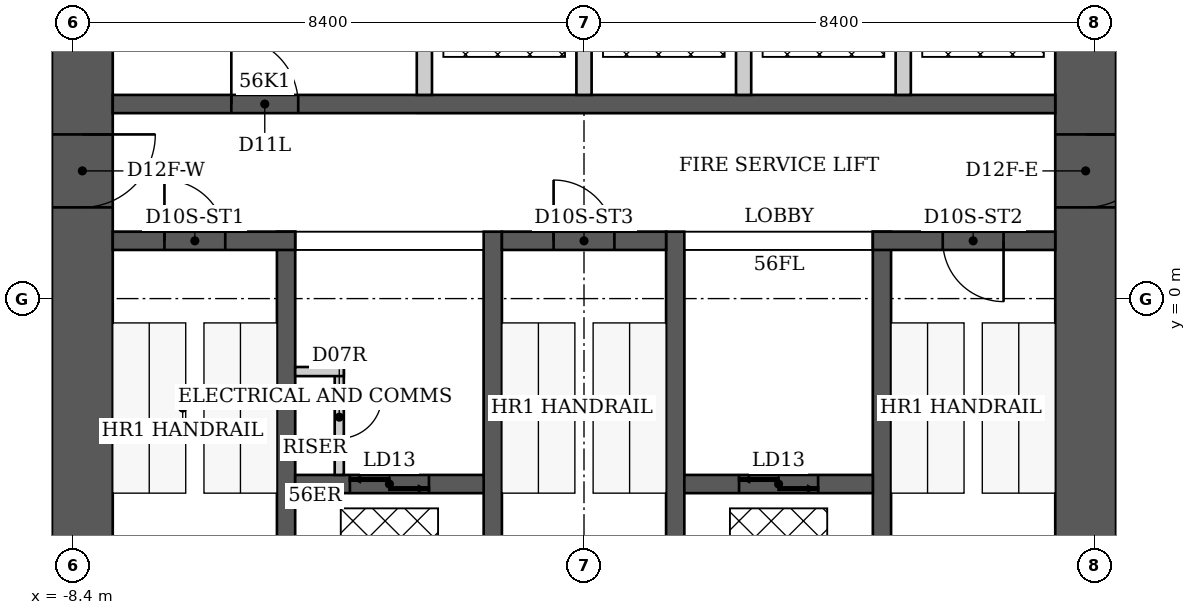
"""IFC4 building model, lengths in metres.
Left out: names, types, materials, properties, quantities, classifications, styles, units other than length and angle.
Written with IfcOpenShell. Run it as: python <this file> out.ifc"""

import sys

from ifc_helpers import new_model, si_unit, direction, frame, frame_2d, origin, place, context, subcontext, project, spatial, rectangle, extrude, element, fill, save


model = new_model("IFC4")
c1 = context("Model", 3, precision=1e-05, world=origin(), true_north=direction((0.0, 1.0)))
c2 = subcontext(c1, "Body", "Model", "MODEL_VIEW")
j1 = project(units=[si_unit("LENGTHUNIT", "METRE"), si_unit("PLANEANGLEUNIT", "RADIAN")], contexts=[c1])
p1 = place(None, origin())
s1 = spatial("IfcSite", under=j1, at=p1, CompositionType="ELEMENT")
p2 = place(p1, origin())
s2 = spatial("IfcBuilding", under=s1, at=p2, CompositionType="ELEMENT")
p3 = place(p2, frame((0.0, 0.0, 225.0)))
s3 = spatial("IfcBuildingStorey", under=s2, at=p3, CompositionType="ELEMENT", Elevation=225.0)
p4 = place(p3, frame((-8.25, -6.1, 0.0), z_axis=(0.0, 0.0, 1.0), x_axis=(0.0, 1.0, 0.0)))
e1 = element("IfcWall", 1, at=p4, inside=s3, PredefinedType="SHEAR", context=c2, shape_type="SweptSolid", body=[
    extrude(rectangle(XDim=12.2, YDim=1.0, at=frame_2d((6.1, 0.0))), origin(), (0.0, 0.0, 1.0), 3.8),
])
p5 = place(p4, frame((7.6, 0.0, 0.0)))
e2 = element("IfcOpeningElement", 2, at=p5, cuts=e1, PredefinedType="OPENING", context=c2, shape_type="SweptSolid", body=[
    extrude(rectangle(XDim=1.2, YDim=2.2, at=frame_2d((0.6, 1.1))), frame((0.0, 0.5, 0.0), z_axis=(0.0, -1.0, 0.0), x_axis=(1.0, 0.0, 0.0)), (0.0, 0.0, 1.0), 1.0),
])
p6 = place(p3, frame((8.25, -6.1, 0.0), z_axis=(0.0, 0.0, 1.0), x_axis=(0.0, 1.0, 0.0)))
e3 = element("IfcWall", 3, at=p6, inside=s3, PredefinedType="SHEAR", context=c2, shape_type="SweptSolid", body=[
    extrude(rectangle(XDim=12.2, YDim=1.0, at=frame_2d((6.1, 0.0))), origin(), (0.0, 0.0, 1.0), 3.8),
])
p7 = place(p6, frame((7.6, 0.0, 0.0)))
e4 = element("IfcOpeningElement", 4, at=p7, cuts=e3, PredefinedType="OPENING", context=c2, shape_type="SweptSolid", body=[
    extrude(rectangle(XDim=1.2, YDim=2.2, at=frame_2d((0.6, 1.1))), frame((0.0, 0.5, 0.0), z_axis=(0.0, -1.0, 0.0), x_axis=(1.0, 0.0, 0.0)), (0.0, 0.0, 1.0), 1.0),
])
for number, where, z_axis, x_axis in (
    (5, (-4.9, -6.1, 0.0), (0.0, 0.0, 1.0), (0.0, 1.0, 0.0)),
    (6, (-1.5, -6.1, 0.0), (0.0, 0.0, 1.0), (0.0, 1.0, 0.0)),
    (7, (1.5, -6.1, 0.0), (0.0, 0.0, 1.0), (0.0, 1.0, 0.0)),
    (8, (4.9, -6.1, 0.0), (0.0, 0.0, 1.0), (0.0, 1.0, 0.0)),
):
    element("IfcWall", number, at=place(p3, frame(where, z_axis=z_axis, x_axis=x_axis)), inside=s3, PredefinedType="SHEAR", context=c2, shape_type="SweptSolid", body=[
        extrude(rectangle(XDim=7.2, YDim=0.3, at=frame_2d((3.6, 0.0))), origin(), (0.0, 0.0, 1.0), 3.8),
    ])
p8 = place(p3, frame((-7.75, 0.95, 0.0), z_axis=(0.0, 0.0, 1.0), x_axis=(1.0, 0.0, 0.0)))
e9 = element("IfcWall", 9, at=p8, inside=s3, PredefinedType="SHEAR", context=c2, shape_type="SweptSolid", body=[
    extrude(rectangle(XDim=3.0, YDim=0.3, at=frame_2d((1.5, 0.0))), origin(), (0.0, 0.0, 1.0), 3.8),
])
p9 = place(p8, frame((0.85, 0.0, 0.0)))
e10 = element("IfcOpeningElement", 10, at=p9, cuts=e9, PredefinedType="OPENING", context=c2, shape_type="SweptSolid", body=[
    extrude(rectangle(XDim=1.0, YDim=2.2, at=frame_2d((0.5, 1.1))), frame((0.0, 0.15, 0.0), z_axis=(0.0, -1.0, 0.0), x_axis=(1.0, 0.0, 0.0)), (0.0, 0.0, 1.0), 0.3),
])
p10 = place(p3, frame((-1.35, 0.95, 0.0), z_axis=(0.0, 0.0, 1.0), x_axis=(1.0, 0.0, 0.0)))
e11 = element("IfcWall", 11, at=p10, inside=s3, PredefinedType="SHEAR", context=c2, shape_type="SweptSolid", body=[
    extrude(rectangle(XDim=2.7, YDim=0.3, at=frame_2d((1.35, 0.0))), origin(), (0.0, 0.0, 1.0), 3.8),
])
p11 = place(p10, frame((0.85, 0.0, 0.0)))
e12 = element("IfcOpeningElement", 12, at=p11, cuts=e11, PredefinedType="OPENING", context=c2, shape_type="SweptSolid", body=[
    extrude(rectangle(XDim=1.0, YDim=2.2, at=frame_2d((0.5, 1.1))), frame((0.0, 0.15, 0.0), z_axis=(0.0, -1.0, 0.0), x_axis=(1.0, 0.0, 0.0)), (0.0, 0.0, 1.0), 0.3),
])
p12 = place(p3, frame((4.75, 0.95, 0.0), z_axis=(0.0, 0.0, 1.0), x_axis=(1.0, 0.0, 0.0)))
e13 = element("IfcWall", 13, at=p12, inside=s3, PredefinedType="SHEAR", context=c2, shape_type="SweptSolid", body=[
    extrude(rectangle(XDim=3.0, YDim=0.3, at=frame_2d((1.5, 0.0))), origin(), (0.0, 0.0, 1.0), 3.8),
])
p13 = place(p12, frame((1.15, 0.0, 0.0)))
e14 = element("IfcOpeningElement", 14, at=p13, cuts=e13, PredefinedType="OPENING", context=c2, shape_type="SweptSolid", body=[
    extrude(rectangle(XDim=1.0, YDim=2.2, at=frame_2d((0.5, 1.1))), frame((0.0, 0.15, 0.0), z_axis=(0.0, -1.0, 0.0), x_axis=(1.0, 0.0, 0.0)), (0.0, 0.0, 1.0), 0.3),
])
p14 = place(p3, frame((-4.75, -3.05, 0.0), z_axis=(0.0, 0.0, 1.0), x_axis=(1.0, 0.0, 0.0)))
e15 = element("IfcWall", 15, at=p14, inside=s3, PredefinedType="SHEAR", context=c2, shape_type="SweptSolid", body=[
    extrude(rectangle(XDim=3.1, YDim=0.3, at=frame_2d((1.55, 0.0))), origin(), (0.0, 0.0, 1.0), 3.8),
])
p15 = place(p14, frame((0.9, 0.0, 0.0)))
e16 = element("IfcOpeningElement", 16, at=p15, cuts=e15, PredefinedType="OPENING", context=c2, shape_type="SweptSolid", body=[
    extrude(rectangle(XDim=1.3, YDim=2.1, at=frame_2d((0.65, 1.05))), frame((0.0, 0.15, 0.0), z_axis=(0.0, -1.0, 0.0), x_axis=(1.0, 0.0, 0.0)), (0.0, 0.0, 1.0), 0.3),
])
p16 = place(p3, frame((1.65, -3.05, 0.0), z_axis=(0.0, 0.0, 1.0), x_axis=(1.0, 0.0, 0.0)))
e17 = element("IfcWall", 17, at=p16, inside=s3, PredefinedType="SHEAR", context=c2, shape_type="SweptSolid", body=[
    extrude(rectangle(XDim=3.1, YDim=0.3, at=frame_2d((1.55, 0.0))), origin(), (0.0, 0.0, 1.0), 3.8),
])
p17 = place(p16, frame((0.9, 0.0, 0.0)))
e18 = element("IfcOpeningElement", 18, at=p17, cuts=e17, PredefinedType="OPENING", context=c2, shape_type="SweptSolid", body=[
    extrude(rectangle(XDim=1.3, YDim=2.1, at=frame_2d((0.65, 1.05))), frame((0.0, 0.15, 0.0), z_axis=(0.0, -1.0, 0.0), x_axis=(1.0, 0.0, 0.0)), (0.0, 0.0, 1.0), 0.3),
])
p18 = place(p3, frame((-7.75, 3.2, 0.0), z_axis=(0.0, 0.0, 1.0), x_axis=(1.0, 0.0, 0.0)))
e19 = element("IfcWall", 19, at=p18, inside=s3, PredefinedType="SHEAR", context=c2, shape_type="SweptSolid", body=[
    extrude(rectangle(XDim=15.5, YDim=0.3, at=frame_2d((7.75, 0.0))), origin(), (0.0, 0.0, 1.0), 3.8),
])
p19 = place(p18, frame((1.95, 0.0, 0.0)))
e20 = element("IfcOpeningElement", 20, at=p19, cuts=e19, PredefinedType="OPENING", context=c2, shape_type="SweptSolid", body=[
    extrude(rectangle(XDim=1.1, YDim=2.2, at=frame_2d((0.55, 1.1))), frame((0.0, 0.15, 0.0), z_axis=(0.0, -1.0, 0.0), x_axis=(1.0, 0.0, 0.0)), (0.0, 0.0, 1.0), 0.3),
])
for number, where, z_axis, x_axis in (
    (21, (-2.625, 3.35, 0.0), (0.0, 0.0, 1.0), (0.0, 1.0, 0.0)),
    (22, (0.0, 3.35, 0.0), (0.0, 0.0, 1.0), (0.0, 1.0, 0.0)),
    (23, (2.625, 3.35, 0.0), (0.0, 0.0, 1.0), (0.0, 1.0, 0.0)),
    (24, (5.25, 3.35, 0.0), (0.0, 0.0, 1.0), (0.0, 1.0, 0.0)),
):
    element("IfcWall", number, at=place(p3, frame(where, z_axis=z_axis, x_axis=x_axis)), inside=s3, PredefinedType="PARTITIONING", context=c2, shape_type="SweptSolid", body=[
        extrude(rectangle(XDim=2.75, YDim=0.25, at=frame_2d((1.375, 0.0))), origin(), (0.0, 0.0, 1.0), 3.8),
    ])
p20 = place(p3, frame((-4.025, -2.9, 0.0), z_axis=(0.0, 0.0, 1.0), x_axis=(0.0, 1.0, 0.0)))
e25 = element("IfcWall", 25, at=p20, inside=s3, PredefinedType="PARTITIONING", context=c2, shape_type="SweptSolid", body=[
    extrude(rectangle(XDim=1.775, YDim=0.15, at=frame_2d((0.887, 0.0))), origin(), (0.0, 0.0, 1.0), 3.64),
])
p21 = place(p20, frame((0.6, 0.0, 0.0)))
e26 = element("IfcOpeningElement", 26, at=p21, cuts=e25, PredefinedType="OPENING", context=c2, shape_type="SweptSolid", body=[
    extrude(rectangle(XDim=0.7, YDim=2.1, at=frame_2d((0.35, 1.05))), frame((0.0, 0.075, 0.0), z_axis=(0.0, -1.0, 0.0), x_axis=(1.0, 0.0, 0.0)), (0.0, 0.0, 1.0), 0.15),
])
p22 = place(p3, frame((-4.75, -1.2, 0.0), z_axis=(0.0, 0.0, 1.0), x_axis=(1.0, 0.0, 0.0)))
e27 = element("IfcWall", 27, at=p22, inside=s3, PredefinedType="PARTITIONING", context=c2, shape_type="SweptSolid", body=[
    extrude(rectangle(XDim=0.8, YDim=0.15, at=frame_2d((0.4, 0.0))), origin(), (0.0, 0.0, 1.0), 3.64),
])
p23 = place(p9, origin())
e28 = element("IfcDoor", 28, at=p23, inside=s3, OperationType="SINGLE_SWING_LEFT", PredefinedType="DOOR", context=c2, shape_type="SweptSolid", body=[
    extrude(rectangle(XDim=1.0, YDim=2.2, at=frame_2d((0.5, 1.1))), frame((0.0, 0.025, 0.0), z_axis=(0.0, -1.0, 0.0), x_axis=(1.0, 0.0, 0.0)), (0.0, 0.0, 1.0), 0.05),
])
fill(e10, e28)
p24 = place(p11, origin())
e29 = element("IfcDoor", 29, at=p24, inside=s3, OperationType="SINGLE_SWING_LEFT", PredefinedType="DOOR", context=c2, shape_type="SweptSolid", body=[
    extrude(rectangle(XDim=1.0, YDim=2.2, at=frame_2d((0.5, 1.1))), frame((0.0, 0.025, 0.0), z_axis=(0.0, -1.0, 0.0), x_axis=(1.0, 0.0, 0.0)), (0.0, 0.0, 1.0), 0.05),
])
fill(e12, e29)
p25 = place(p13, origin())
e30 = element("IfcDoor", 30, at=p25, inside=s3, OperationType="SINGLE_SWING_RIGHT", PredefinedType="DOOR", context=c2, shape_type="SweptSolid", body=[
    extrude(rectangle(XDim=1.0, YDim=2.2, at=frame_2d((0.5, 1.1))), frame((0.0, 0.025, 0.0), z_axis=(0.0, -1.0, 0.0), x_axis=(1.0, 0.0, 0.0)), (0.0, 0.0, 1.0), 0.05),
])
fill(e14, e30)
p26 = place(p5, origin())
e31 = element("IfcDoor", 31, at=p26, inside=s3, OperationType="SINGLE_SWING_RIGHT", PredefinedType="DOOR", context=c2, shape_type="SweptSolid", body=[
    extrude(rectangle(XDim=1.2, YDim=2.2, at=frame_2d((0.6, 1.1))), frame((0.0, 0.025, 0.0), z_axis=(0.0, -1.0, 0.0), x_axis=(1.0, 0.0, 0.0)), (0.0, 0.0, 1.0), 0.05),
])
fill(e2, e31)
p27 = place(p7, origin())
e32 = element("IfcDoor", 32, at=p27, inside=s3, OperationType="SINGLE_SWING_RIGHT", PredefinedType="DOOR", context=c2, shape_type="SweptSolid", body=[
    extrude(rectangle(XDim=1.2, YDim=2.2, at=frame_2d((0.6, 1.1))), frame((0.0, 0.025, 0.0), z_axis=(0.0, -1.0, 0.0), x_axis=(1.0, 0.0, 0.0)), (0.0, 0.0, 1.0), 0.05),
])
fill(e4, e32)
p28 = place(p21, origin())
e33 = element("IfcDoor", 33, at=p28, inside=s3, OperationType="SINGLE_SWING_RIGHT", PredefinedType="DOOR", context=c2, shape_type="SweptSolid", body=[
    extrude(rectangle(XDim=0.7, YDim=2.1, at=frame_2d((0.35, 1.05))), frame((0.0, 0.025, 0.0), z_axis=(0.0, -1.0, 0.0), x_axis=(1.0, 0.0, 0.0)), (0.0, 0.0, 1.0), 0.05),
])
fill(e26, e33)
p29 = place(p19, origin())
e34 = element("IfcDoor", 34, at=p29, inside=s3, OperationType="SINGLE_SWING_LEFT", PredefinedType="DOOR", context=c2, shape_type="SweptSolid", body=[
    extrude(rectangle(XDim=1.1, YDim=2.2, at=frame_2d((0.55, 1.1))), frame((0.0, 0.025, 0.0), z_axis=(0.0, -1.0, 0.0), x_axis=(1.0, 0.0, 0.0)), (0.0, 0.0, 1.0), 0.05),
])
fill(e20, e34)
p30 = place(p15, origin())
e35 = element("IfcDoor", 35, at=p30, inside=s3, OperationType="DOUBLE_DOOR_SLIDING", PredefinedType="DOOR", context=c2, shape_type="SweptSolid", body=[
    extrude(rectangle(XDim=1.3, YDim=2.1, at=frame_2d((0.65, 1.05))), frame((0.0, 0.025, 0.0), z_axis=(0.0, -1.0, 0.0), x_axis=(1.0, 0.0, 0.0)), (0.0, 0.0, 1.0), 0.05),
])
fill(e16, e35)
p31 = place(p17, origin())
e36 = element("IfcDoor", 36, at=p31, inside=s3, OperationType="DOUBLE_DOOR_SLIDING", PredefinedType="DOOR", context=c2, shape_type="SweptSolid", body=[
    extrude(rectangle(XDim=1.3, YDim=2.1, at=frame_2d((0.65, 1.05))), frame((0.0, 0.025, 0.0), z_axis=(0.0, -1.0, 0.0), x_axis=(1.0, 0.0, 0.0)), (0.0, 0.0, 1.0), 0.05),
])
fill(e18, e36)
save(model, sys.argv[1])
